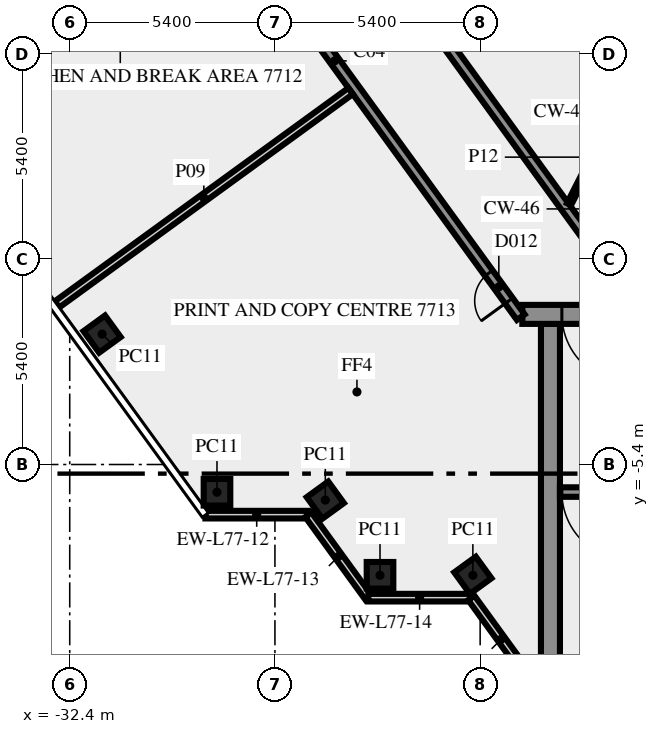
"""IFC4 building model, lengths in metres.
Left out: names, types, materials, properties, quantities, classifications, styles, units other than length and angle.
Written with IfcOpenShell. Run it as: python <this file> out.ifc"""

import sys

from ifc_helpers import new_model, si_unit, direction, frame, frame_2d, origin, origin_2d, place, context, subcontext, project, spatial, rectangle, extrude, element, fill, save


model = new_model("IFC4")
c1 = context("Model", 3, precision=1e-05, world=origin(), true_north=direction((0.0, 1.0)))
c2 = subcontext(c1, "Body", "Model", "MODEL_VIEW")
j1 = project(units=[si_unit("LENGTHUNIT", "METRE"), si_unit("PLANEANGLEUNIT", "RADIAN")], contexts=[c1])
p1 = place(None, origin())
s1 = spatial("IfcSite", under=j1, at=p1, CompositionType="ELEMENT")
p2 = place(p1, origin())
s2 = spatial("IfcBuilding", under=s1, at=p2, CompositionType="ELEMENT")
p3 = place(p2, frame((0.0, 0.0, 331.0)))
s3 = spatial("IfcBuildingStorey", under=s2, at=p3, CompositionType="ELEMENT", Elevation=331.0)
for number, where, z_axis, x_axis in (
    (1, (-31.548, -1.969, 0.0), (0.0, 0.0, 1.0), (0.588, -0.809, 0.0)),
    (2, (-28.525, -6.13, 0.0), (0.0, 0.0, 1.0), (1.0, 0.0, 0.0)),
    (3, (-25.674, -6.337, 0.0), (0.0, 0.0, 1.0), (0.588, -0.809, 0.0)),
    (4, (-24.235, -8.315, 0.0), (0.0, 0.0, 1.0), (1.0, 0.0, 0.0)),
    (5, (-21.792, -8.315, 0.0), (0.0, 0.0, 1.0), (0.588, -0.809, 0.0)),
):
    element("IfcColumn", number, at=place(p3, frame(where, z_axis=z_axis, x_axis=x_axis)), inside=s3, PredefinedType="COLUMN", context=c2, shape_type="SweptSolid", body=[
        extrude(rectangle(XDim=0.7, YDim=0.7, at=origin_2d()), origin(), (0.0, 0.0, 1.0), 3.65),
    ])
p4 = place(p3, frame((-28.83, -6.719, 0.0), z_axis=(0.0, 0.0, 1.0), x_axis=(1.0, 0.0, 0.0)))
e6 = element("IfcWall", 6, at=p4, inside=s3, PredefinedType="SOLIDWALL", context=c2, shape_type="SweptSolid", body=[
    extrude(rectangle(XDim=2.7, YDim=0.2, at=frame_2d((1.35, 0.0))), origin(), (0.0, 0.0, 1.0), 3.65),
])
p5 = place(p3, frame((-26.12, -6.724, 0.0), z_axis=(0.0, 0.0, 1.0), x_axis=(0.587720002413, -0.809064397168, 0.0)))
e7 = element("IfcWall", 7, at=p5, inside=s3, PredefinedType="SOLIDWALL", context=c2, shape_type="SweptSolid", body=[
    extrude(rectangle(XDim=2.7, YDim=0.2, at=frame_2d((1.35, 0.0))), origin(), (0.0, 0.0, 1.0), 3.65),
])
p6 = place(p3, frame((-24.543, -8.904, 0.0), z_axis=(0.0, 0.0, 1.0), x_axis=(1.0, 0.0, 0.0)))
e8 = element("IfcWall", 8, at=p6, inside=s3, PredefinedType="SOLIDWALL", context=c2, shape_type="SweptSolid", body=[
    extrude(rectangle(XDim=2.7, YDim=0.2, at=frame_2d((1.35, 0.0))), origin(), (0.0, 0.0, 1.0), 3.65),
])
p7 = place(p3, frame((-21.833, -8.909, 0.0), z_axis=(0.0, 0.0, 1.0), x_axis=(0.587766567315, -0.809030569476, 0.0)))
e9 = element("IfcWall", 9, at=p7, inside=s3, PredefinedType="SOLIDWALL", context=c2, shape_type="SweptSolid", body=[
    extrude(rectangle(XDim=2.688, YDim=0.2, at=frame_2d((1.344, 0.0))), origin(), (0.0, 0.0, 1.0), 3.65),
])
p8 = place(p3, frame((-19.75, -10.5, 0.0), z_axis=(0.0, 0.0, 1.0), x_axis=(0.0, 1.0, 0.0)))
e10 = element("IfcWall", 10, at=p8, inside=s3, PredefinedType="SHEAR", context=c2, shape_type="SweptSolid", body=[
    extrude(rectangle(XDim=8.8, YDim=0.5, at=frame_2d((4.4, 0.0))), origin(), (0.0, 0.0, 1.0), 3.65),
])
p9 = place(p3, frame((-11.45, -6.125, 0.0), z_axis=(0.0, 0.0, 1.0), x_axis=(-1.0, 0.0, 0.0)))
e11 = element("IfcWall", 11, at=p9, inside=s3, PredefinedType="SHEAR", context=c2, shape_type="SweptSolid", body=[
    extrude(rectangle(XDim=8.05, YDim=0.25, at=frame_2d((4.025, 0.0))), origin(), (0.0, 0.0, 1.0), 3.65),
])
p10 = place(p9, frame((6.2, 0.0, 0.0)))
e12 = element("IfcOpeningElement", 12, at=p10, cuts=e11, PredefinedType="OPENING", context=c2, shape_type="SweptSolid", body=[
    extrude(rectangle(XDim=1.8, YDim=2.1, at=frame_2d((0.9, 1.05))), frame((0.0, 0.135, 0.0), z_axis=(0.0, -1.0, 0.0), x_axis=(1.0, 0.0, 0.0)), (0.0, 0.0, 1.0), 0.27),
])
p11 = place(p3, frame((20.49, -1.45, 0.0), z_axis=(0.0, 0.0, 1.0), x_axis=(-1.0, 0.0, 0.0)))
e13 = element("IfcWall", 13, at=p11, inside=s3, PredefinedType="SHEAR", context=c2, shape_type="SweptSolid", body=[
    extrude(rectangle(XDim=40.98, YDim=0.5, at=frame_2d((20.49, 0.0))), origin(), (0.0, 0.0, 1.0), 3.65),
])
p12 = place(p11, frame((38.14, 0.0, 0.0)))
e14 = element("IfcOpeningElement", 14, at=p12, cuts=e13, PredefinedType="OPENING", context=c2, shape_type="SweptSolid", body=[
    extrude(rectangle(XDim=1.8, YDim=2.1, at=frame_2d((0.9, 1.05))), frame((0.0, 0.26, 0.0), z_axis=(0.0, -1.0, 0.0), x_axis=(1.0, 0.0, 0.0)), (0.0, 0.0, 1.0), 0.52),
])
p13 = place(p11, frame((36.728, 0.0, 0.0)))
e15 = element("IfcOpeningElement", 15, at=p13, cuts=e13, PredefinedType="OPENING", context=c2, shape_type="SweptSolid", body=[
    extrude(rectangle(XDim=0.8, YDim=2.1, at=frame_2d((0.4, 1.05))), frame((0.0, 0.26, 0.0), z_axis=(0.0, -1.0, 0.0), x_axis=(1.0, 0.0, 0.0)), (0.0, 0.0, 1.0), 0.52),
])
p14 = place(p11, frame((35.153, 0.0, 0.0)))
e16 = element("IfcOpeningElement", 16, at=p14, cuts=e13, PredefinedType="OPENING", context=c2, shape_type="SweptSolid", body=[
    extrude(rectangle(XDim=0.8, YDim=2.1, at=frame_2d((0.4, 1.05))), frame((0.0, 0.26, 0.0), z_axis=(0.0, -1.0, 0.0), x_axis=(1.0, 0.0, 0.0)), (0.0, 0.0, 1.0), 0.52),
])
p15 = place(p11, frame((32.94, 0.0, 0.0)))
e17 = element("IfcOpeningElement", 17, at=p15, cuts=e13, PredefinedType="OPENING", context=c2, shape_type="SweptSolid", body=[
    extrude(rectangle(XDim=0.9, YDim=2.1, at=frame_2d((0.45, 1.05))), frame((0.0, 0.26, 0.0), z_axis=(0.0, -1.0, 0.0), x_axis=(1.0, 0.0, 0.0)), (0.0, 0.0, 1.0), 0.52),
])
p16 = place(p11, frame((31.015, 0.0, 0.0)))
e18 = element("IfcOpeningElement", 18, at=p16, cuts=e13, PredefinedType="OPENING", context=c2, shape_type="SweptSolid", body=[
    extrude(rectangle(XDim=0.8, YDim=2.1, at=frame_2d((0.4, 1.05))), frame((0.0, 0.26, 0.0), z_axis=(0.0, -1.0, 0.0), x_axis=(1.0, 0.0, 0.0)), (0.0, 0.0, 1.0), 0.52),
])
p17 = place(p11, frame((24.765, 0.0, 0.0)))
e19 = element("IfcOpeningElement", 19, at=p17, cuts=e13, PredefinedType="OPENING", context=c2, shape_type="SweptSolid", body=[
    extrude(rectangle(XDim=0.8, YDim=2.1, at=frame_2d((0.4, 1.05))), frame((0.0, 0.26, 0.0), z_axis=(0.0, -1.0, 0.0), x_axis=(1.0, 0.0, 0.0)), (0.0, 0.0, 1.0), 0.52),
])
p18 = place(p11, frame((19.59, 0.0, 0.0)))
e20 = element("IfcOpeningElement", 20, at=p18, cuts=e13, PredefinedType="OPENING", context=c2, shape_type="SweptSolid", body=[
    extrude(rectangle(XDim=2.0, YDim=2.1, at=frame_2d((1.0, 1.05))), frame((0.0, 0.26, 0.0), z_axis=(0.0, -1.0, 0.0), x_axis=(1.0, 0.0, 0.0)), (0.0, 0.0, 1.0), 0.52),
])
p19 = place(p11, frame((15.103, 0.0, 0.0)))
e21 = element("IfcOpeningElement", 21, at=p19, cuts=e13, PredefinedType="OPENING", context=c2, shape_type="SweptSolid", body=[
    extrude(rectangle(XDim=0.9, YDim=2.1, at=frame_2d((0.45, 1.05))), frame((0.0, 0.26, 0.0), z_axis=(0.0, -1.0, 0.0), x_axis=(1.0, 0.0, 0.0)), (0.0, 0.0, 1.0), 0.52),
])
p20 = place(p11, frame((13.04, 0.0, 0.0)))
e22 = element("IfcOpeningElement", 22, at=p20, cuts=e13, PredefinedType="OPENING", context=c2, shape_type="SweptSolid", body=[
    extrude(rectangle(XDim=0.9, YDim=2.1, at=frame_2d((0.45, 1.05))), frame((0.0, 0.26, 0.0), z_axis=(0.0, -1.0, 0.0), x_axis=(1.0, 0.0, 0.0)), (0.0, 0.0, 1.0), 0.52),
])
p21 = place(p11, frame((10.177, 0.0, 0.0)))
e23 = element("IfcOpeningElement", 23, at=p21, cuts=e13, PredefinedType="OPENING", context=c2, shape_type="SweptSolid", body=[
    extrude(rectangle(XDim=0.9, YDim=2.1, at=frame_2d((0.45, 1.05))), frame((0.0, 0.26, 0.0), z_axis=(0.0, -1.0, 0.0), x_axis=(1.0, 0.0, 0.0)), (0.0, 0.0, 1.0), 0.52),
])
p22 = place(p11, frame((7.14, 0.0, 0.0)))
e24 = element("IfcOpeningElement", 24, at=p22, cuts=e13, PredefinedType="OPENING", context=c2, shape_type="SweptSolid", body=[
    extrude(rectangle(XDim=0.9, YDim=2.1, at=frame_2d((0.45, 1.05))), frame((0.0, 0.26, 0.0), z_axis=(0.0, -1.0, 0.0), x_axis=(1.0, 0.0, 0.0)), (0.0, 0.0, 1.0), 0.52),
])
p23 = place(p11, frame((4.19, 0.0, 0.0)))
e25 = element("IfcOpeningElement", 25, at=p23, cuts=e13, PredefinedType="OPENING", context=c2, shape_type="SweptSolid", body=[
    extrude(rectangle(XDim=0.9, YDim=2.1, at=frame_2d((0.45, 1.05))), frame((0.0, 0.26, 0.0), z_axis=(0.0, -1.0, 0.0), x_axis=(1.0, 0.0, 0.0)), (0.0, 0.0, 1.0), 0.52),
])
p24 = place(p11, frame((1.04, 0.0, 0.0)))
e26 = element("IfcOpeningElement", 26, at=p24, cuts=e13, PredefinedType="OPENING", context=c2, shape_type="SweptSolid", body=[
    extrude(rectangle(XDim=1.8, YDim=2.1, at=frame_2d((0.9, 1.05))), frame((0.0, 0.26, 0.0), z_axis=(0.0, -1.0, 0.0), x_axis=(1.0, 0.0, 0.0)), (0.0, 0.0, 1.0), 0.52),
])
p25 = place(p3, frame((-20.531, -1.523, 0.0), z_axis=(0.0, 0.0, 1.0), x_axis=(-0.587785867777, 0.809016547199, 0.0)))
e27 = element("IfcWall", 27, at=p25, inside=s3, PredefinedType="SOLIDWALL", context=c2, shape_type="SweptSolid", body=[
    extrude(rectangle(XDim=16.67, YDim=0.25, at=frame_2d((8.335, 0.0))), origin(), (0.0, 0.0, 1.0), 3.65),
])
p26 = place(p25, frame((0.533, 0.0, 0.0)))
e28 = element("IfcOpeningElement", 28, at=p26, cuts=e27, PredefinedType="OPENING", context=c2, shape_type="SweptSolid", body=[
    extrude(rectangle(XDim=0.9, YDim=2.1, at=frame_2d((0.45, 1.05))), frame((0.0, 0.135, 0.0), z_axis=(0.0, -1.0, 0.0), x_axis=(1.0, 0.0, 0.0)), (0.0, 0.0, 1.0), 0.27),
])
p27 = place(p25, frame((15.296, 0.0, 0.0)))
e29 = element("IfcOpeningElement", 29, at=p27, cuts=e27, PredefinedType="OPENING", context=c2, shape_type="SweptSolid", body=[
    extrude(rectangle(XDim=0.9, YDim=2.1, at=frame_2d((0.45, 1.05))), frame((0.0, 0.135, 0.0), z_axis=(0.0, -1.0, 0.0), x_axis=(1.0, 0.0, 0.0)), (0.0, 0.0, 1.0), 0.27),
])
p28 = place(p3, frame((-28.039, 13.319, 0.0), z_axis=(0.0, 0.0, 1.0), x_axis=(0.587791911753, -0.809012155952, 0.0)))
e30 = element("IfcWall", 30, at=p28, inside=s3, PredefinedType="SOLIDWALL", context=c2, shape_type="SweptSolid", body=[
    extrude(rectangle(XDim=17.853, YDim=0.25, at=frame_2d((8.927, 0.0))), origin(), (0.0, 0.0, 1.0), 3.65),
])
p29 = place(p28, frame((0.225, 0.0, 0.0)))
e31 = element("IfcOpeningElement", 31, at=p29, cuts=e30, PredefinedType="OPENING", context=c2, shape_type="SweptSolid", body=[
    extrude(rectangle(XDim=0.9, YDim=2.1, at=frame_2d((0.45, 1.05))), frame((0.0, 0.135, 0.0), z_axis=(0.0, -1.0, 0.0), x_axis=(1.0, 0.0, 0.0)), (0.0, 0.0, 1.0), 0.27),
])
p30 = place(p3, frame((-25.008, 4.427, 0.0), z_axis=(0.0, 0.0, 1.0), x_axis=(-0.808994684961, -0.587815957341, 0.0)))
e32 = element("IfcWall", 32, at=p30, inside=s3, PredefinedType="SOLIDWALL", context=c2, shape_type="SweptSolid", body=[
    extrude(rectangle(XDim=9.55, YDim=0.2, at=frame_2d((4.775, 0.0))), origin(), (0.0, 0.0, 1.0), 2.95),
])
p31 = place(p3, frame((-19.261, 1.45, 0.0), z_axis=(0.0, 0.0, 1.0), x_axis=(0.453950796792, 0.891026752736, 0.0)))
e33 = element("IfcWall", 33, at=p31, inside=s3, PredefinedType="PARTITIONING", context=c2, shape_type="SweptSolid", body=[
    extrude(rectangle(XDim=2.778, YDim=0.12, at=frame_2d((1.389, 0.0))), origin(), (0.0, 0.0, 1.0), 3.65),
])
p32 = place(p10, origin())
e34 = element("IfcDoor", 34, at=p32, inside=s3, OperationType="DOUBLE_DOOR_SINGLE_SWING", PredefinedType="DOOR", context=c2, shape_type="SweptSolid", body=[
    extrude(rectangle(XDim=1.8, YDim=2.1, at=frame_2d((0.9, 1.05))), frame((0.0, 0.025, 0.0), z_axis=(0.0, -1.0, 0.0), x_axis=(1.0, 0.0, 0.0)), (0.0, 0.0, 1.0), 0.05),
])
fill(e12, e34)
p33 = place(p12, origin())
e35 = element("IfcDoor", 35, at=p33, inside=s3, OperationType="DOUBLE_DOOR_SINGLE_SWING", PredefinedType="DOOR", context=c2, shape_type="SweptSolid", body=[
    extrude(rectangle(XDim=1.8, YDim=2.1, at=frame_2d((0.9, 1.05))), frame((0.0, 0.025, 0.0), z_axis=(0.0, -1.0, 0.0), x_axis=(1.0, 0.0, 0.0)), (0.0, 0.0, 1.0), 0.05),
])
fill(e14, e35)
p34 = place(p26, origin())
e36 = element("IfcDoor", 36, at=p34, inside=s3, OperationType="SINGLE_SWING_LEFT", PredefinedType="DOOR", context=c2, shape_type="SweptSolid", body=[
    extrude(rectangle(XDim=0.9, YDim=2.1, at=frame_2d((0.45, 1.05))), frame((0.0, 0.025, 0.0), z_axis=(0.0, -1.0, 0.0), x_axis=(1.0, 0.0, 0.0)), (0.0, 0.0, 1.0), 0.05),
])
fill(e28, e36)
save(model, sys.argv[1])
